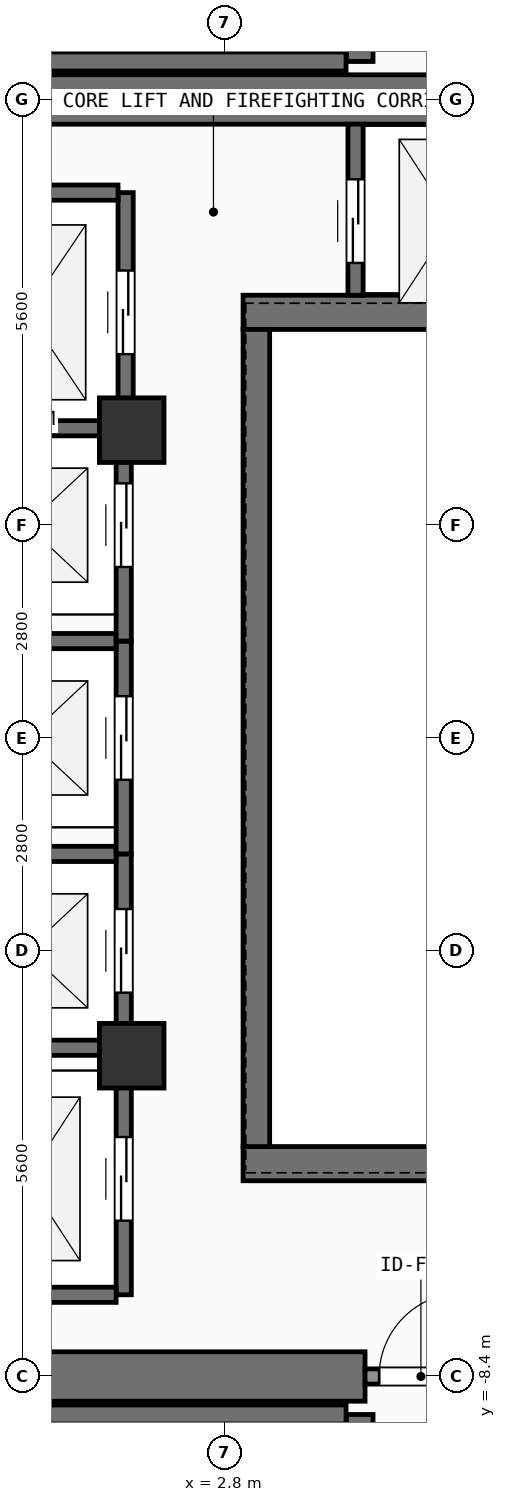
"""IFC4 building model, lengths in metres.
Left out: names, types, materials, properties, quantities, classifications, styles, units other than length and angle.
Written with IfcOpenShell. Run it as: python <this file> out.ifc"""

import sys

from ifc_helpers import new_model, si_unit, direction, frame, frame_2d, origin, origin_2d, place, context, subcontext, project, spatial, rectangle, extrude, element, fill, save


model = new_model("IFC4")
c1 = context("Model", 3, precision=1e-05, world=origin(), true_north=direction((0.0, 1.0)))
c2 = subcontext(c1, "Body", "Model", "MODEL_VIEW")
j1 = project(units=[si_unit("LENGTHUNIT", "METRE"), si_unit("PLANEANGLEUNIT", "RADIAN")], contexts=[c1])
p1 = place(None, origin())
s1 = spatial("IfcSite", under=j1, at=p1, CompositionType="ELEMENT")
p2 = place(p1, origin())
s2 = spatial("IfcBuilding", under=s1, at=p2, CompositionType="ELEMENT")
p3 = place(p2, frame((0.0, 0.0, 293.7)))
s3 = spatial("IfcBuildingStorey", under=s2, at=p3, CompositionType="ELEMENT", Elevation=293.7)
p4 = place(p3, frame((-2.62, -8.4, 0.0), z_axis=(0.0, 0.0, 1.0), x_axis=(1.0, 0.0, 0.0)))
e1 = element("IfcWall", 1, at=p4, inside=s3, PredefinedType="SHEAR", context=c2, shape_type="SweptSolid", body=[
    extrude(rectangle(XDim=7.27, YDim=0.65, at=frame_2d((3.635, 0.0))), origin(), (0.0, 0.0, 1.0), 3.9),
])
p5 = place(p3, frame((-7.55, 8.4, 0.0), z_axis=(0.0, 0.0, 1.0), x_axis=(1.0, 0.0, 0.0)))
e2 = element("IfcWall", 2, at=p5, inside=s3, PredefinedType="SHEAR", context=c2, shape_type="SweptSolid", body=[
    extrude(rectangle(XDim=16.275, YDim=0.65, at=frame_2d((8.138, 0.0))), origin(), (0.0, 0.0, 1.0), 3.9),
])
for number, where, z_axis, x_axis in (
    (3, (3.045, -5.6, 0.0), (0.0, 0.0, 1.0), (1.0, 0.0, 0.0)),
    (4, (3.045, 5.6, 0.0), (0.0, 0.0, 1.0), (1.0, 0.0, 0.0)),
):
    element("IfcWall", number, at=place(p3, frame(where, z_axis=z_axis, x_axis=x_axis)), inside=s3, PredefinedType="SHEAR", context=c2, shape_type="SweptSolid", body=[
        extrude(rectangle(XDim=5.68, YDim=0.45, at=frame_2d((2.84, 0.0))), origin(), (0.0, 0.0, 1.0), 3.9),
    ])
p6 = place(p3, frame((3.22, -5.375, 0.0), z_axis=(0.0, 0.0, 1.0), x_axis=(0.0, 1.0, 0.0)))
e5 = element("IfcWall", 5, at=p6, inside=s3, PredefinedType="SHEAR", context=c2, shape_type="SweptSolid", body=[
    extrude(rectangle(XDim=10.75, YDim=0.35, at=frame_2d((5.375, 0.0))), origin(), (0.0, 0.0, 1.0), 3.9),
])
p7 = place(p3, frame((-2.2, -8.9, 0.0), z_axis=(0.0, 0.0, 1.0), x_axis=(1.0, 0.0, 0.0)))
e6 = element("IfcWall", 6, at=p7, inside=s3, PredefinedType="SHEAR", context=c2, shape_type="SweptSolid", body=[
    extrude(rectangle(XDim=6.6, YDim=0.25, at=frame_2d((3.3, 0.0))), origin(), (0.0, 0.0, 1.0), 3.9),
])
p8 = place(p3, frame((4.58, -8.9, 0.0), z_axis=(0.0, 0.0, 1.0), x_axis=(0.0, -1.0, 0.0)))
e7 = element("IfcWall", 7, at=p8, inside=s3, PredefinedType="SHEAR", context=c2, shape_type="SweptSolid", body=[
    extrude(rectangle(XDim=2.925, YDim=0.35, at=frame_2d((1.462, 0.0))), origin(), (0.0, 0.0, 1.0), 3.9),
])
p9 = place(p8, frame((0.913, 0.0, 0.0)))
e8 = element("IfcOpeningElement", 8, at=p9, cuts=e7, PredefinedType="OPENING", context=c2, shape_type="SweptSolid", body=[
    extrude(rectangle(XDim=1.1, YDim=2.15, at=frame_2d((0.55, 1.075))), frame((0.0, 0.185, 0.0), z_axis=(0.0, -1.0, 0.0), x_axis=(1.0, 0.0, 0.0)), (0.0, 0.0, 1.0), 0.37),
])
p10 = place(p3, frame((-2.2, 8.9, 0.0), z_axis=(0.0, 0.0, 1.0), x_axis=(1.0, 0.0, 0.0)))
e9 = element("IfcWall", 9, at=p10, inside=s3, PredefinedType="SHEAR", context=c2, shape_type="SweptSolid", body=[
    extrude(rectangle(XDim=6.6, YDim=0.25, at=frame_2d((3.3, 0.0))), origin(), (0.0, 0.0, 1.0), 3.9),
])
p11 = place(p3, frame((4.58, 11.825, 0.0), z_axis=(0.0, 0.0, 1.0), x_axis=(0.0, -1.0, 0.0)))
e10 = element("IfcWall", 10, at=p11, inside=s3, PredefinedType="SHEAR", context=c2, shape_type="SweptSolid", body=[
    extrude(rectangle(XDim=2.925, YDim=0.35, at=frame_2d((1.462, 0.0))), origin(), (0.0, 0.0, 1.0), 3.9),
])
p12 = place(p11, frame((0.913, 0.0, 0.0)))
e11 = element("IfcOpeningElement", 11, at=p12, cuts=e10, PredefinedType="OPENING", context=c2, shape_type="SweptSolid", body=[
    extrude(rectangle(XDim=1.1, YDim=2.15, at=frame_2d((0.55, 1.075))), frame((0.0, 0.185, 0.0), z_axis=(0.0, -1.0, 0.0), x_axis=(1.0, 0.0, 0.0)), (0.0, 0.0, 1.0), 0.37),
])
for number, where, z_axis, x_axis in (
    (12, (1.58, -4.18, 0.0), (0.0, 0.0, 1.0), (1.0, 0.0, 0.0)),
    (13, (1.58, 4.05, 0.0), (0.0, 0.0, 1.0), (1.0, 0.0, 0.0)),
):
    element("IfcColumn", number, at=place(p3, frame(where, z_axis=z_axis, x_axis=x_axis)), inside=s3, PredefinedType="COLUMN", context=c2, shape_type="SweptSolid", body=[
        extrude(rectangle(XDim=0.85, YDim=0.85, at=origin_2d()), origin(), (0.0, 0.0, 1.0), 3.9),
    ])
p13 = place(p3, frame((1.475, -4.275, 0.0), z_axis=(0.0, 0.0, 1.0), x_axis=(0.0, 1.0, 0.0)))
e14 = element("IfcWall", 14, at=p13, inside=s3, PredefinedType="SHEAR", context=c2, shape_type="SweptSolid", body=[
    extrude(rectangle(XDim=2.75, YDim=0.2, at=frame_2d((1.375, 0.0))), origin(), (0.0, 0.0, 1.0), 3.68),
])
p14 = place(p13, frame((0.925, 0.0, 0.0)))
e15 = element("IfcOpeningElement", 15, at=p14, cuts=e14, PredefinedType="OPENING", context=c2, shape_type="SweptSolid", body=[
    extrude(rectangle(XDim=1.1, YDim=2.2, at=frame_2d((0.55, 1.1))), frame((0.0, 0.11, 0.0), z_axis=(0.0, -1.0, 0.0), x_axis=(1.0, 0.0, 0.0)), (0.0, 0.0, 1.0), 0.22),
])
for number, where, z_axis, x_axis in (
    (16, (-0.975, -4.075, 0.0), (0.0, 0.0, 1.0), (1.0, 0.0, 0.0)),
    (17, (-0.975, -1.525, 0.0), (0.0, 0.0, 1.0), (1.0, 0.0, 0.0)),
):
    element("IfcWall", number, at=place(p3, frame(where, z_axis=z_axis, x_axis=x_axis)), inside=s3, PredefinedType="SHEAR", context=c2, shape_type="SweptSolid", body=[
        extrude(rectangle(XDim=2.35, YDim=0.2, at=frame_2d((1.175, 0.0))), origin(), (0.0, 0.0, 1.0), 3.68),
    ])
p15 = place(p3, frame((1.475, -1.525, 0.0), z_axis=(0.0, 0.0, 1.0), x_axis=(0.0, 1.0, 0.0)))
e18 = element("IfcWall", 18, at=p15, inside=s3, PredefinedType="SHEAR", context=c2, shape_type="SweptSolid", body=[
    extrude(rectangle(XDim=2.8, YDim=0.2, at=frame_2d((1.4, 0.0))), origin(), (0.0, 0.0, 1.0), 3.68),
])
p16 = place(p15, frame((0.975, 0.0, 0.0)))
e19 = element("IfcOpeningElement", 19, at=p16, cuts=e18, PredefinedType="OPENING", context=c2, shape_type="SweptSolid", body=[
    extrude(rectangle(XDim=1.1, YDim=2.2, at=frame_2d((0.55, 1.1))), frame((0.0, 0.11, 0.0), z_axis=(0.0, -1.0, 0.0), x_axis=(1.0, 0.0, 0.0)), (0.0, 0.0, 1.0), 0.22),
])
p17 = place(p3, frame((-0.975, 1.275, 0.0), z_axis=(0.0, 0.0, 1.0), x_axis=(1.0, 0.0, 0.0)))
e20 = element("IfcWall", 20, at=p17, inside=s3, PredefinedType="SHEAR", context=c2, shape_type="SweptSolid", body=[
    extrude(rectangle(XDim=2.35, YDim=0.2, at=frame_2d((1.175, 0.0))), origin(), (0.0, 0.0, 1.0), 3.68),
])
p18 = place(p3, frame((1.475, 1.275, 0.0), z_axis=(0.0, 0.0, 1.0), x_axis=(0.0, 1.0, 0.0)))
e21 = element("IfcWall", 21, at=p18, inside=s3, PredefinedType="SHEAR", context=c2, shape_type="SweptSolid", body=[
    extrude(rectangle(XDim=2.8, YDim=0.2, at=frame_2d((1.4, 0.0))), origin(), (0.0, 0.0, 1.0), 3.68),
])
p19 = place(p18, frame((0.975, 0.0, 0.0)))
e22 = element("IfcOpeningElement", 22, at=p19, cuts=e21, PredefinedType="OPENING", context=c2, shape_type="SweptSolid", body=[
    extrude(rectangle(XDim=1.1, YDim=2.2, at=frame_2d((0.55, 1.1))), frame((0.0, 0.11, 0.0), z_axis=(0.0, -1.0, 0.0), x_axis=(1.0, 0.0, 0.0)), (0.0, 0.0, 1.0), 0.22),
])
p20 = place(p3, frame((-0.975, 4.075, 0.0), z_axis=(0.0, 0.0, 1.0), x_axis=(1.0, 0.0, 0.0)))
e23 = element("IfcWall", 23, at=p20, inside=s3, PredefinedType="SHEAR", context=c2, shape_type="SweptSolid", body=[
    extrude(rectangle(XDim=2.35, YDim=0.2, at=frame_2d((1.175, 0.0))), origin(), (0.0, 0.0, 1.0), 3.68),
])
p21 = place(p3, frame((1.5, 4.025, 0.0), z_axis=(0.0, 0.0, 1.0), x_axis=(0.0, 1.0, 0.0)))
e24 = element("IfcWall", 24, at=p21, inside=s3, PredefinedType="SHEAR", context=c2, shape_type="SweptSolid", body=[
    extrude(rectangle(XDim=3.15, YDim=0.2, at=frame_2d((1.575, 0.0))), origin(), (0.0, 0.0, 1.0), 3.68),
])
p22 = place(p21, frame((1.025, 0.0, 0.0)))
e25 = element("IfcOpeningElement", 25, at=p22, cuts=e24, PredefinedType="OPENING", context=c2, shape_type="SweptSolid", body=[
    extrude(rectangle(XDim=1.1, YDim=2.2, at=frame_2d((0.55, 1.1))), frame((0.0, 0.11, 0.0), z_axis=(0.0, -1.0, 0.0), x_axis=(1.0, 0.0, 0.0)), (0.0, 0.0, 1.0), 0.22),
])
p23 = place(p3, frame((-1.0, 7.175, 0.0), z_axis=(0.0, 0.0, 1.0), x_axis=(1.0, 0.0, 0.0)))
e26 = element("IfcWall", 26, at=p23, inside=s3, PredefinedType="SHEAR", context=c2, shape_type="SweptSolid", body=[
    extrude(rectangle(XDim=2.4, YDim=0.2, at=frame_2d((1.2, 0.0))), origin(), (0.0, 0.0, 1.0), 3.68),
])
p24 = place(p3, frame((1.475, -7.325, 0.0), z_axis=(0.0, 0.0, 1.0), x_axis=(0.0, 1.0, 0.0)))
e27 = element("IfcWall", 27, at=p24, inside=s3, PredefinedType="SHEAR", context=c2, shape_type="SweptSolid", body=[
    extrude(rectangle(XDim=3.05, YDim=0.2, at=frame_2d((1.525, 0.0))), origin(), (0.0, 0.0, 1.0), 3.68),
])
p25 = place(p24, frame((0.975, 0.0, 0.0)))
e28 = element("IfcOpeningElement", 28, at=p25, cuts=e27, PredefinedType="OPENING", context=c2, shape_type="SweptSolid", body=[
    extrude(rectangle(XDim=1.1, YDim=2.2, at=frame_2d((0.55, 1.1))), frame((0.0, 0.11, 0.0), z_axis=(0.0, -1.0, 0.0), x_axis=(1.0, 0.0, 0.0)), (0.0, 0.0, 1.0), 0.22),
])
p26 = place(p3, frame((-0.975, -7.325, 0.0), z_axis=(0.0, 0.0, 1.0), x_axis=(1.0, 0.0, 0.0)))
e29 = element("IfcWall", 29, at=p26, inside=s3, PredefinedType="SHEAR", context=c2, shape_type="SweptSolid", body=[
    extrude(rectangle(XDim=2.35, YDim=0.2, at=frame_2d((1.175, 0.0))), origin(), (0.0, 0.0, 1.0), 3.68),
])
p27 = place(p3, frame((4.525, 5.825, 0.0), z_axis=(0.0, 0.0, 1.0), x_axis=(0.0, 1.0, 0.0)))
e30 = element("IfcWall", 30, at=p27, inside=s3, PredefinedType="SHEAR", context=c2, shape_type="SweptSolid", body=[
    extrude(rectangle(XDim=2.25, YDim=0.2, at=frame_2d((1.125, 0.0))), origin(), (0.0, 0.0, 1.0), 3.68),
])
p28 = place(p27, frame((0.425, 0.0, 0.0)))
e31 = element("IfcOpeningElement", 31, at=p28, cuts=e30, PredefinedType="OPENING", context=c2, shape_type="SweptSolid", body=[
    extrude(rectangle(XDim=1.1, YDim=2.2, at=frame_2d((0.55, 1.1))), frame((0.0, 0.11, 0.0), z_axis=(0.0, -1.0, 0.0), x_axis=(1.0, 0.0, 0.0)), (0.0, 0.0, 1.0), 0.22),
])
p29 = place(p3, frame((4.65, -8.4, 0.0), z_axis=(0.0, 0.0, 1.0), x_axis=(1.0, 0.0, 0.0)))
e32 = element("IfcWall", 32, at=p29, inside=s3, PredefinedType="SOLIDWALL", context=c2, shape_type="SweptSolid", body=[
    extrude(rectangle(XDim=1.47, YDim=0.2, at=frame_2d((0.735, 0.0))), origin(), (0.0, 0.0, 1.0), 2.92),
])
p30 = place(p29, frame((0.185, 0.0, 0.0)))
e33 = element("IfcOpeningElement", 33, at=p30, cuts=e32, PredefinedType="OPENING", context=c2, shape_type="SweptSolid", body=[
    extrude(rectangle(XDim=1.1, YDim=2.15, at=frame_2d((0.55, 1.075))), frame((0.0, 0.11, 0.0), z_axis=(0.0, -1.0, 0.0), x_axis=(1.0, 0.0, 0.0)), (0.0, 0.0, 1.0), 0.22),
])
p31 = place(p14, origin())
e34 = element("IfcDoor", 34, at=p31, inside=s3, OperationType="SLIDING_TO_LEFT", PredefinedType="DOOR", context=c2, shape_type="SweptSolid", body=[
    extrude(rectangle(XDim=1.1, YDim=2.2, at=frame_2d((0.55, 1.1))), frame((0.0, 0.025, 0.0), z_axis=(0.0, -1.0, 0.0), x_axis=(1.0, 0.0, 0.0)), (0.0, 0.0, 1.0), 0.05),
])
fill(e15, e34)
p32 = place(p16, origin())
e35 = element("IfcDoor", 35, at=p32, inside=s3, OperationType="SLIDING_TO_LEFT", PredefinedType="DOOR", context=c2, shape_type="SweptSolid", body=[
    extrude(rectangle(XDim=1.1, YDim=2.2, at=frame_2d((0.55, 1.1))), frame((0.0, 0.025, 0.0), z_axis=(0.0, -1.0, 0.0), x_axis=(1.0, 0.0, 0.0)), (0.0, 0.0, 1.0), 0.05),
])
fill(e19, e35)
p33 = place(p19, origin())
e36 = element("IfcDoor", 36, at=p33, inside=s3, OperationType="SLIDING_TO_LEFT", PredefinedType="DOOR", context=c2, shape_type="SweptSolid", body=[
    extrude(rectangle(XDim=1.1, YDim=2.2, at=frame_2d((0.55, 1.1))), frame((0.0, 0.025, 0.0), z_axis=(0.0, -1.0, 0.0), x_axis=(1.0, 0.0, 0.0)), (0.0, 0.0, 1.0), 0.05),
])
fill(e22, e36)
p34 = place(p22, origin())
e37 = element("IfcDoor", 37, at=p34, inside=s3, OperationType="SLIDING_TO_LEFT", PredefinedType="DOOR", context=c2, shape_type="SweptSolid", body=[
    extrude(rectangle(XDim=1.1, YDim=2.2, at=frame_2d((0.55, 1.1))), frame((0.0, 0.025, 0.0), z_axis=(0.0, -1.0, 0.0), x_axis=(1.0, 0.0, 0.0)), (0.0, 0.0, 1.0), 0.05),
])
fill(e25, e37)
p35 = place(p25, origin())
e38 = element("IfcDoor", 38, at=p35, inside=s3, OperationType="SLIDING_TO_LEFT", PredefinedType="DOOR", context=c2, shape_type="SweptSolid", body=[
    extrude(rectangle(XDim=1.1, YDim=2.2, at=frame_2d((0.55, 1.1))), frame((0.0, 0.025, 0.0), z_axis=(0.0, -1.0, 0.0), x_axis=(1.0, 0.0, 0.0)), (0.0, 0.0, 1.0), 0.05),
])
fill(e28, e38)
p36 = place(p28, origin())
e39 = element("IfcDoor", 39, at=p36, inside=s3, OperationType="SLIDING_TO_LEFT", PredefinedType="DOOR", context=c2, shape_type="SweptSolid", body=[
    extrude(rectangle(XDim=1.1, YDim=2.2, at=frame_2d((0.55, 1.1))), frame((0.0, 0.025, 0.0), z_axis=(0.0, -1.0, 0.0), x_axis=(1.0, 0.0, 0.0)), (0.0, 0.0, 1.0), 0.05),
])
fill(e31, e39)
p37 = place(p30, origin())
e40 = element("IfcDoor", 40, at=p37, inside=s3, OperationType="SINGLE_SWING_RIGHT", PredefinedType="DOOR", context=c2, shape_type="SweptSolid", body=[
    extrude(rectangle(XDim=1.1, YDim=2.15, at=frame_2d((0.55, 1.075))), frame((0.0, 0.025, 0.0), z_axis=(0.0, -1.0, 0.0), x_axis=(1.0, 0.0, 0.0)), (0.0, 0.0, 1.0), 0.05),
])
fill(e33, e40)
save(model, sys.argv[1])
